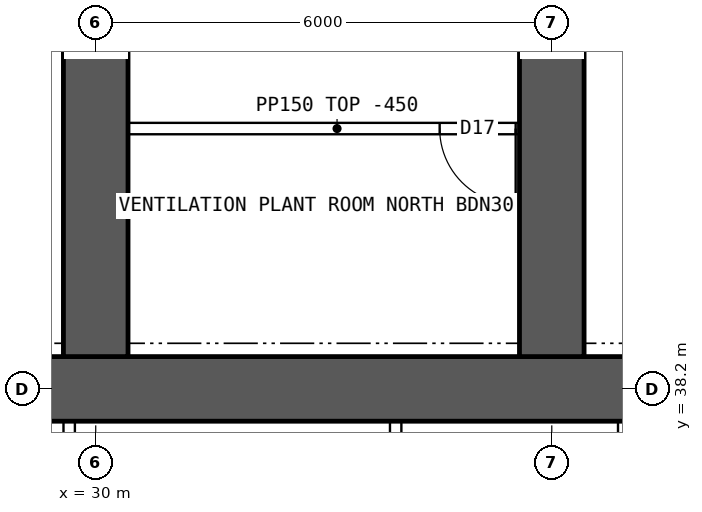
"""IFC4 building model, lengths in metres.
Left out: names, types, materials, properties, quantities, classifications, styles, units other than length and angle.
Written with IfcOpenShell. Run it as: python <this file> out.ifc"""

import sys

from ifc_helpers import new_model, si_unit, direction, frame, frame_2d, origin, place, context, subcontext, project, spatial, rectangle, extrude, element, fill, save


model = new_model("IFC4")
c1 = context("Model", 3, precision=1e-05, world=origin(), true_north=direction((0.0, 1.0)))
c2 = subcontext(c1, "Body", "Model", "MODEL_VIEW")
j1 = project(units=[si_unit("LENGTHUNIT", "METRE"), si_unit("PLANEANGLEUNIT", "RADIAN")], contexts=[c1])
p1 = place(None, origin())
s1 = spatial("IfcSite", under=j1, at=p1, CompositionType="ELEMENT")
p2 = place(p1, origin())
s2 = spatial("IfcBuilding", under=s1, at=p2, CompositionType="ELEMENT")
p3 = place(p2, frame((0.0, 0.0, 189.85)))
s3 = spatial("IfcBuildingStorey", under=s2, at=p3, CompositionType="ELEMENT", Elevation=189.85)
p4 = place(p3, frame((18.0, 38.2, 0.0), z_axis=(0.0, 0.0, 1.0), x_axis=(1.0, 0.0, 0.0)))
e1 = element("IfcWall", 1, at=p4, inside=s3, PredefinedType="SHEAR", context=c2, shape_type="SweptSolid", body=[
    extrude(rectangle(XDim=48.0, YDim=0.85, at=frame_2d((24.0, 0.0))), origin(), (0.0, 0.0, 1.0), 3.75),
])
for number, where, z_axis, x_axis in (
    (2, (30.0, 38.625, 0.0), (0.0, 0.0, 1.0), (0.0, 1.0, 0.0)),
    (3, (36.0, 38.625, 0.0), (0.0, 0.0, 1.0), (0.0, 1.0, 0.0)),
):
    element("IfcWall", number, at=place(p3, frame(where, z_axis=z_axis, x_axis=x_axis)), inside=s3, PredefinedType="SHEAR", context=c2, shape_type="SweptSolid", body=[
        extrude(rectangle(XDim=8.175, YDim=0.85, at=frame_2d((4.087, 0.0))), origin(), (0.0, 0.0, 1.0), 3.75),
    ])
for number, where, z_axis, x_axis in (
    (4, (29.651, 34.75, 0.0), (0.0, 0.0, 1.0), (0.0, 1.0, 0.0)),
    (5, (33.946, 34.75, 0.0), (0.0, 0.0, 1.0), (0.0, 1.0, 0.0)),
    (6, (36.946, 34.75, 0.0), (0.0, 0.0, 1.0), (0.0, 1.0, 0.0)),
):
    element("IfcWall", number, at=place(p3, frame(where, z_axis=z_axis, x_axis=x_axis)), inside=s3, PredefinedType="SOLIDWALL", context=c2, shape_type="SweptSolid", body=[
        extrude(rectangle(XDim=3.025, YDim=0.15, at=frame_2d((1.512, 0.0))), origin(), (0.0, 0.0, 1.0), 3.3),
    ])
p5 = place(p3, frame((35.925, 41.625, 0.0), z_axis=(0.0, 0.0, 1.0), x_axis=(-1.0, 0.0, 0.0)))
e7 = element("IfcWall", 7, at=p5, inside=s3, PredefinedType="PARTITIONING", context=c2, shape_type="SweptSolid", body=[
    extrude(rectangle(XDim=5.5, YDim=0.15, at=frame_2d((2.75, 0.0))), origin(), (0.0, 0.0, 1.0), 3.3),
])
p6 = place(p5, frame((0.4, 0.0, 0.0)))
e8 = element("IfcOpeningElement", 8, at=p6, cuts=e7, PredefinedType="OPENING", context=c2, shape_type="SweptSolid", body=[
    extrude(rectangle(XDim=1.0, YDim=2.1, at=frame_2d((0.5, 1.05))), frame((0.0, 0.085, 0.0), z_axis=(0.0, -1.0, 0.0), x_axis=(1.0, 0.0, 0.0)), (0.0, 0.0, 1.0), 0.17),
])
p7 = place(p6, origin())
e9 = element("IfcDoor", 9, at=p7, inside=s3, OperationType="SINGLE_SWING_LEFT", PredefinedType="DOOR", context=c2, shape_type="SweptSolid", body=[
    extrude(rectangle(XDim=1.0, YDim=2.1, at=frame_2d((0.5, 1.05))), frame((0.0, 0.025, 0.0), z_axis=(0.0, -1.0, 0.0), x_axis=(1.0, 0.0, 0.0)), (0.0, 0.0, 1.0), 0.05),
])
fill(e8, e9)
save(model, sys.argv[1])
